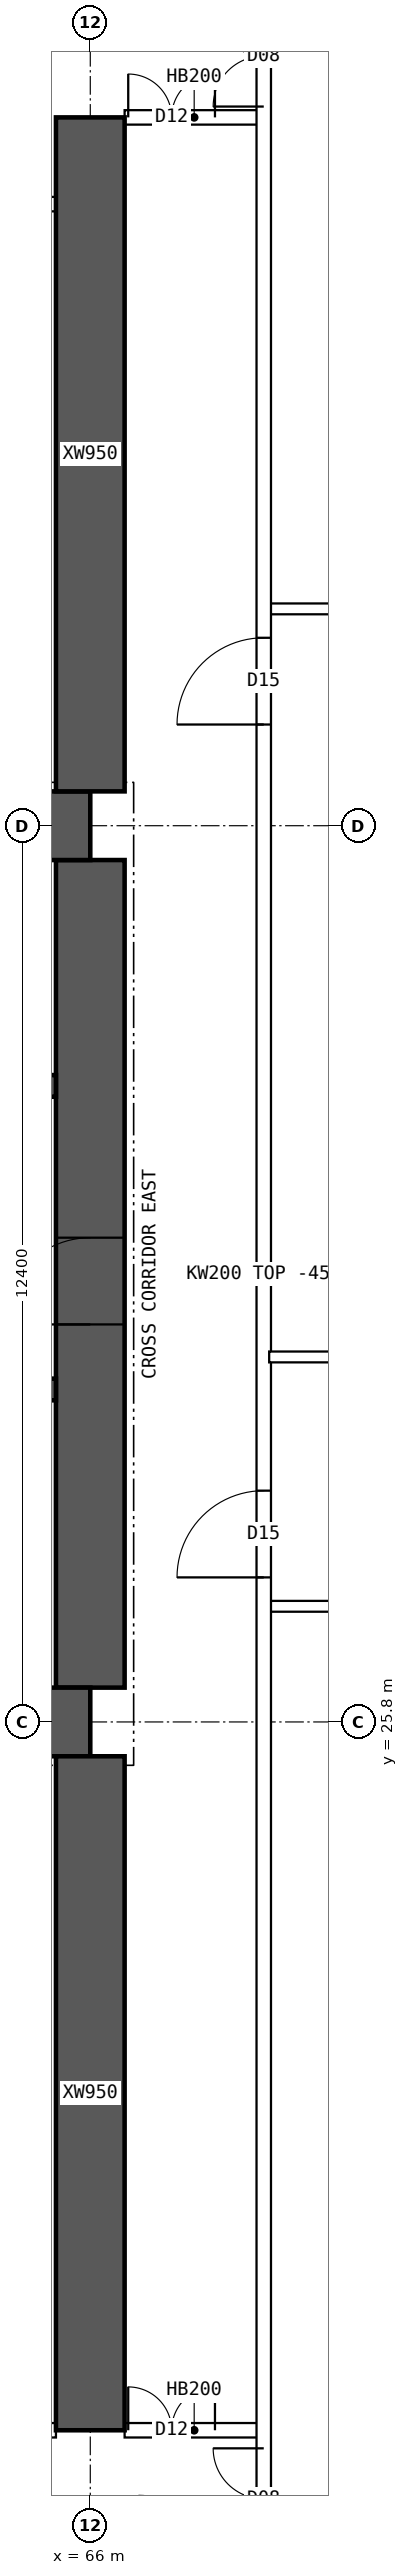
"""IFC4 building model, lengths in metres.
Left out: names, types, materials, properties, quantities, classifications, styles, units other than length and angle.
Written with IfcOpenShell. Run it as: python <this file> out.ifc"""

import sys

from ifc_helpers import new_model, si_unit, direction, frame, frame_2d, origin, place, context, subcontext, project, spatial, polyline, rectangle, outline, extrude, element, fill, save


model = new_model("IFC4")
c1 = context("Model", 3, precision=1e-05, world=origin(), true_north=direction((0.0, 1.0)))
c2 = subcontext(c1, "Body", "Model", "MODEL_VIEW")
j1 = project(units=[si_unit("LENGTHUNIT", "METRE"), si_unit("PLANEANGLEUNIT", "RADIAN")], contexts=[c1])
p1 = place(None, origin())
s1 = spatial("IfcSite", under=j1, at=p1, CompositionType="ELEMENT")
p2 = place(p1, origin())
s2 = spatial("IfcBuilding", under=s1, at=p2, CompositionType="ELEMENT")
p3 = place(p2, frame((0.0, 0.0, 95.65)))
s3 = spatial("IfcBuildingStorey", under=s2, at=p3, CompositionType="ELEMENT", Elevation=95.65)
for number, where, z_axis, x_axis in (
    (1, (18.0, 25.8, 0.0), (0.0, 0.0, 1.0), (1.0, 0.0, 0.0)),
    (2, (18.0, 38.2, 0.0), (0.0, 0.0, 1.0), (1.0, 0.0, 0.0)),
):
    element("IfcWall", number, at=place(p3, frame(where, z_axis=z_axis, x_axis=x_axis)), inside=s3, PredefinedType="SHEAR", context=c2, shape_type="SweptSolid", body=[
        extrude(rectangle(XDim=48.0, YDim=0.95, at=frame_2d((24.0, 0.0))), origin(), (0.0, 0.0, 1.0), 3.75),
    ])
p4 = place(p3, frame((66.0, 26.275, 0.0), z_axis=(0.0, 0.0, 1.0), x_axis=(0.0, 1.0, 0.0)))
e3 = element("IfcWall", 3, at=p4, inside=s3, PredefinedType="SHEAR", context=c2, shape_type="SweptSolid", body=[
    extrude(rectangle(XDim=11.45, YDim=0.95, at=frame_2d((5.725, 0.0))), origin(), (0.0, 0.0, 1.0), 3.75),
])
p5 = place(p4, frame((5.025, 0.0, 0.0)))
e4 = element("IfcOpeningElement", 4, at=p5, cuts=e3, PredefinedType="OPENING", context=c2, shape_type="SweptSolid", body=[
    extrude(rectangle(XDim=1.2, YDim=2.1, at=frame_2d((0.6, 1.05))), frame((0.0, 0.485, 0.0), z_axis=(0.0, -1.0, 0.0), x_axis=(1.0, 0.0, 0.0)), (0.0, 0.0, 1.0), 0.97),
])
p6 = place(p3, frame((18.475, 30.4, 0.0), z_axis=(0.0, 0.0, 1.0), x_axis=(1.0, 0.0, 0.0)))
e5 = element("IfcWall", 5, at=p6, inside=s3, PredefinedType="SHEAR", context=c2, shape_type="SweptSolid", body=[
    extrude(rectangle(XDim=47.05, YDim=0.3, at=frame_2d((23.525, 0.0))), origin(), (0.0, 0.0, 1.0), 3.75),
])
p7 = place(p6, frame((0.4, 0.0, 0.0)))
e6 = element("IfcOpeningElement", 6, at=p7, cuts=e5, PredefinedType="OPENING", context=c2, shape_type="SweptSolid", body=[
    extrude(rectangle(XDim=1.0, YDim=2.1, at=frame_2d((0.5, 1.05))), frame((0.0, 0.16, 0.0), z_axis=(0.0, -1.0, 0.0), x_axis=(1.0, 0.0, 0.0)), (0.0, 0.0, 1.0), 0.32),
])
p8 = place(p6, frame((45.65, 0.0, 0.0)))
e7 = element("IfcOpeningElement", 7, at=p8, cuts=e5, PredefinedType="OPENING", context=c2, shape_type="SweptSolid", body=[
    extrude(rectangle(XDim=1.0, YDim=2.1, at=frame_2d((0.5, 1.05))), frame((0.0, 0.16, 0.0), z_axis=(0.0, -1.0, 0.0), x_axis=(1.0, 0.0, 0.0)), (0.0, 0.0, 1.0), 0.32),
])
p9 = place(p6, frame((8.275, 0.0, 0.0)))
e8 = element("IfcOpeningElement", 8, at=p9, cuts=e5, PredefinedType="OPENING", context=c2, shape_type="SweptSolid", body=[
    extrude(rectangle(XDim=1.1, YDim=2.1, at=frame_2d((0.55, 1.05))), frame((0.0, 0.16, 0.0), z_axis=(0.0, -1.0, 0.0), x_axis=(1.0, 0.0, 0.0)), (0.0, 0.0, 1.0), 0.32),
])
p10 = place(p6, frame((10.875, 0.0, 0.0)))
e9 = element("IfcOpeningElement", 9, at=p10, cuts=e5, PredefinedType="OPENING", context=c2, shape_type="SweptSolid", body=[
    extrude(rectangle(XDim=1.1, YDim=2.1, at=frame_2d((0.55, 1.05))), frame((0.0, 0.16, 0.0), z_axis=(0.0, -1.0, 0.0), x_axis=(1.0, 0.0, 0.0)), (0.0, 0.0, 1.0), 0.32),
])
p11 = place(p6, frame((13.475, 0.0, 0.0)))
e10 = element("IfcOpeningElement", 10, at=p11, cuts=e5, PredefinedType="OPENING", context=c2, shape_type="SweptSolid", body=[
    extrude(rectangle(XDim=1.1, YDim=2.1, at=frame_2d((0.55, 1.05))), frame((0.0, 0.16, 0.0), z_axis=(0.0, -1.0, 0.0), x_axis=(1.0, 0.0, 0.0)), (0.0, 0.0, 1.0), 0.32),
])
p12 = place(p6, frame((16.075, 0.0, 0.0)))
e11 = element("IfcOpeningElement", 11, at=p12, cuts=e5, PredefinedType="OPENING", context=c2, shape_type="SweptSolid", body=[
    extrude(rectangle(XDim=1.1, YDim=2.1, at=frame_2d((0.55, 1.05))), frame((0.0, 0.16, 0.0), z_axis=(0.0, -1.0, 0.0), x_axis=(1.0, 0.0, 0.0)), (0.0, 0.0, 1.0), 0.32),
])
p13 = place(p6, frame((18.85, 0.0, 0.0)))
e12 = element("IfcOpeningElement", 12, at=p13, cuts=e5, PredefinedType="OPENING", context=c2, shape_type="SweptSolid", body=[
    extrude(rectangle(XDim=0.9, YDim=2.1, at=frame_2d((0.45, 1.05))), frame((0.0, 0.16, 0.0), z_axis=(0.0, -1.0, 0.0), x_axis=(1.0, 0.0, 0.0)), (0.0, 0.0, 1.0), 0.32),
])
p14 = place(p6, frame((30.142, 0.0, 0.0)))
e13 = element("IfcOpeningElement", 13, at=p14, cuts=e5, PredefinedType="OPENING", context=c2, shape_type="SweptSolid", body=[
    extrude(rectangle(XDim=1.1, YDim=2.1, at=frame_2d((0.55, 1.05))), frame((0.0, 0.16, 0.0), z_axis=(0.0, -1.0, 0.0), x_axis=(1.0, 0.0, 0.0)), (0.0, 0.0, 1.0), 0.32),
])
p15 = place(p6, frame((33.675, 0.0, 0.0)))
e14 = element("IfcOpeningElement", 14, at=p15, cuts=e5, PredefinedType="OPENING", context=c2, shape_type="SweptSolid", body=[
    extrude(rectangle(XDim=1.1, YDim=2.1, at=frame_2d((0.55, 1.05))), frame((0.0, 0.16, 0.0), z_axis=(0.0, -1.0, 0.0), x_axis=(1.0, 0.0, 0.0)), (0.0, 0.0, 1.0), 0.32),
])
p16 = place(p6, frame((37.208, 0.0, 0.0)))
e15 = element("IfcOpeningElement", 15, at=p16, cuts=e5, PredefinedType="OPENING", context=c2, shape_type="SweptSolid", body=[
    extrude(rectangle(XDim=1.1, YDim=2.1, at=frame_2d((0.55, 1.05))), frame((0.0, 0.16, 0.0), z_axis=(0.0, -1.0, 0.0), x_axis=(1.0, 0.0, 0.0)), (0.0, 0.0, 1.0), 0.32),
])
p17 = place(p3, frame((18.475, 34.6, 0.0), z_axis=(0.0, 0.0, 1.0), x_axis=(1.0, 0.0, 0.0)))
e16 = element("IfcWall", 16, at=p17, inside=s3, PredefinedType="SHEAR", context=c2, shape_type="SweptSolid", body=[
    extrude(rectangle(XDim=47.05, YDim=0.3, at=frame_2d((23.525, 0.0))), origin(), (0.0, 0.0, 1.0), 3.75),
])
p18 = place(p17, frame((0.9, 0.0, 0.0)))
e17 = element("IfcOpeningElement", 17, at=p18, cuts=e16, PredefinedType="OPENING", context=c2, shape_type="SweptSolid", body=[
    extrude(rectangle(XDim=1.1, YDim=2.1, at=frame_2d((0.55, 1.05))), frame((0.0, 0.16, 0.0), z_axis=(0.0, -1.0, 0.0), x_axis=(1.0, 0.0, 0.0)), (0.0, 0.0, 1.0), 0.32),
])
p19 = place(p17, frame((45.05, 0.0, 0.0)))
e18 = element("IfcOpeningElement", 18, at=p19, cuts=e16, PredefinedType="OPENING", context=c2, shape_type="SweptSolid", body=[
    extrude(rectangle(XDim=1.1, YDim=2.1, at=frame_2d((0.55, 1.05))), frame((0.0, 0.16, 0.0), z_axis=(0.0, -1.0, 0.0), x_axis=(1.0, 0.0, 0.0)), (0.0, 0.0, 1.0), 0.32),
])
p20 = place(p17, frame((4.125, 0.0, 0.0)))
e19 = element("IfcOpeningElement", 19, at=p20, cuts=e16, PredefinedType="OPENING", context=c2, shape_type="SweptSolid", body=[
    extrude(rectangle(XDim=0.9, YDim=2.1, at=frame_2d((0.45, 1.05))), frame((0.0, 0.16, 0.0), z_axis=(0.0, -1.0, 0.0), x_axis=(1.0, 0.0, 0.0)), (0.0, 0.0, 1.0), 0.32),
])
p21 = place(p17, frame((42.025, 0.0, 0.0)))
e20 = element("IfcOpeningElement", 20, at=p21, cuts=e16, PredefinedType="OPENING", context=c2, shape_type="SweptSolid", body=[
    extrude(rectangle(XDim=0.9, YDim=2.1, at=frame_2d((0.45, 1.05))), frame((0.0, 0.16, 0.0), z_axis=(0.0, -1.0, 0.0), x_axis=(1.0, 0.0, 0.0)), (0.0, 0.0, 1.0), 0.32),
])
p22 = place(p17, frame((8.9, 0.0, 0.0)))
e21 = element("IfcOpeningElement", 21, at=p22, cuts=e16, PredefinedType="OPENING", context=c2, shape_type="SweptSolid", body=[
    extrude(rectangle(XDim=0.9, YDim=2.1, at=frame_2d((0.45, 1.05))), frame((0.0, 0.16, 0.0), z_axis=(0.0, -1.0, 0.0), x_axis=(1.0, 0.0, 0.0)), (0.0, 0.0, 1.0), 0.32),
])
p23 = place(p17, frame((12.874, 0.0, 0.0)))
e22 = element("IfcOpeningElement", 22, at=p23, cuts=e16, PredefinedType="OPENING", context=c2, shape_type="SweptSolid", body=[
    extrude(rectangle(XDim=0.9, YDim=2.1, at=frame_2d((0.45, 1.05))), frame((0.0, 0.16, 0.0), z_axis=(0.0, -1.0, 0.0), x_axis=(1.0, 0.0, 0.0)), (0.0, 0.0, 1.0), 0.32),
])
p24 = place(p17, frame((16.521, 0.0, 0.0)))
e23 = element("IfcOpeningElement", 23, at=p24, cuts=e16, PredefinedType="OPENING", context=c2, shape_type="SweptSolid", body=[
    extrude(rectangle(XDim=0.9, YDim=2.1, at=frame_2d((0.45, 1.05))), frame((0.0, 0.16, 0.0), z_axis=(0.0, -1.0, 0.0), x_axis=(1.0, 0.0, 0.0)), (0.0, 0.0, 1.0), 0.32),
])
p25 = place(p17, frame((20.28, 0.0, 0.0)))
e24 = element("IfcOpeningElement", 24, at=p25, cuts=e16, PredefinedType="OPENING", context=c2, shape_type="SweptSolid", body=[
    extrude(rectangle(XDim=0.9, YDim=2.1, at=frame_2d((0.45, 1.05))), frame((0.0, 0.16, 0.0), z_axis=(0.0, -1.0, 0.0), x_axis=(1.0, 0.0, 0.0)), (0.0, 0.0, 1.0), 0.32),
])
p26 = place(p17, frame((24.686, 0.0, 0.0)))
e25 = element("IfcOpeningElement", 25, at=p26, cuts=e16, PredefinedType="OPENING", context=c2, shape_type="SweptSolid", body=[
    extrude(rectangle(XDim=0.9, YDim=2.1, at=frame_2d((0.45, 1.05))), frame((0.0, 0.16, 0.0), z_axis=(0.0, -1.0, 0.0), x_axis=(1.0, 0.0, 0.0)), (0.0, 0.0, 1.0), 0.32),
])
p27 = place(p17, frame((27.483, 0.0, 0.0)))
e26 = element("IfcOpeningElement", 26, at=p27, cuts=e16, PredefinedType="OPENING", context=c2, shape_type="SweptSolid", body=[
    extrude(rectangle(XDim=0.9, YDim=2.1, at=frame_2d((0.45, 1.05))), frame((0.0, 0.16, 0.0), z_axis=(0.0, -1.0, 0.0), x_axis=(1.0, 0.0, 0.0)), (0.0, 0.0, 1.0), 0.32),
])
p28 = place(p17, frame((30.666, 0.0, 0.0)))
e27 = element("IfcOpeningElement", 27, at=p28, cuts=e16, PredefinedType="OPENING", context=c2, shape_type="SweptSolid", body=[
    extrude(rectangle(XDim=0.9, YDim=2.1, at=frame_2d((0.45, 1.05))), frame((0.0, 0.16, 0.0), z_axis=(0.0, -1.0, 0.0), x_axis=(1.0, 0.0, 0.0)), (0.0, 0.0, 1.0), 0.32),
])
p29 = place(p17, frame((34.617, 0.0, 0.0)))
e28 = element("IfcOpeningElement", 28, at=p29, cuts=e16, PredefinedType="OPENING", context=c2, shape_type="SweptSolid", body=[
    extrude(rectangle(XDim=0.9, YDim=2.1, at=frame_2d((0.45, 1.05))), frame((0.0, 0.16, 0.0), z_axis=(0.0, -1.0, 0.0), x_axis=(1.0, 0.0, 0.0)), (0.0, 0.0, 1.0), 0.32),
])
p30 = place(p17, frame((37.555, 0.0, 0.0)))
e29 = element("IfcOpeningElement", 29, at=p30, cuts=e16, PredefinedType="OPENING", context=c2, shape_type="SweptSolid", body=[
    extrude(rectangle(XDim=0.9, YDim=2.1, at=frame_2d((0.45, 1.05))), frame((0.0, 0.16, 0.0), z_axis=(0.0, -1.0, 0.0), x_axis=(1.0, 0.0, 0.0)), (0.0, 0.0, 1.0), 0.32),
])
for number, where, z_axis, x_axis in (
    (30, (66.0, 16.0, 0.0), (0.0, 0.0, 1.0), (0.0, 1.0, 0.0)),
    (31, (66.0, 38.675, 0.0), (0.0, 0.0, 1.0), (0.0, 1.0, 0.0)),
):
    element("IfcWall", number, at=place(p3, frame(where, z_axis=z_axis, x_axis=x_axis)), inside=s3, PredefinedType="SHEAR", context=c2, shape_type="SweptSolid", body=[
        extrude(rectangle(XDim=9.325, YDim=0.95, at=frame_2d((4.663, 0.0))), origin(), (0.0, 0.0, 1.0), 3.75),
    ])
p31 = place(p3, frame((60.475, 16.0, 0.0), z_axis=(0.0, 0.0, 1.0), x_axis=(1.0, 0.0, 0.0)))
e32 = element("IfcWall", 32, at=p31, inside=s3, PredefinedType="SOLIDWALL", context=c2, shape_type="SweptSolid", body=[
    extrude(rectangle(XDim=5.05, YDim=0.2, at=frame_2d((2.525, 0.0))), origin(), (0.0, 0.0, 1.0), 3.3),
])
p32 = place(p31, frame((0.15, 0.0, 0.0)))
e33 = element("IfcOpeningElement", 33, at=p32, cuts=e32, PredefinedType="OPENING", context=c2, shape_type="SweptSolid", body=[
    extrude(rectangle(XDim=0.9, YDim=2.1, at=frame_2d((0.45, 1.05))), frame((0.0, 0.11, 0.0), z_axis=(0.0, -1.0, 0.0), x_axis=(1.0, 0.0, 0.0)), (0.0, 0.0, 1.0), 0.22),
])
p33 = place(p31, frame((3.185, 0.0, 0.0)))
e34 = element("IfcOpeningElement", 34, at=p33, cuts=e32, PredefinedType="OPENING", context=c2, shape_type="SweptSolid", body=[
    extrude(rectangle(XDim=0.9, YDim=2.1, at=frame_2d((0.45, 1.05))), frame((0.0, 0.11, 0.0), z_axis=(0.0, -1.0, 0.0), x_axis=(1.0, 0.0, 0.0)), (0.0, 0.0, 1.0), 0.22),
])
p34 = place(p3, frame((66.475, 16.0, 0.0), z_axis=(0.0, 0.0, 1.0), x_axis=(1.0, 0.0, 0.0)))
e35 = element("IfcWall", 35, at=p34, inside=s3, PredefinedType="SOLIDWALL", context=c2, shape_type="SweptSolid", body=[
    extrude(rectangle(XDim=1.925, YDim=0.2, at=frame_2d((0.962, 0.0))), origin(), (0.0, 0.0, 1.0), 3.3),
])
p35 = place(p34, frame((0.05, 0.0, 0.0)))
e36 = element("IfcOpeningElement", 36, at=p35, cuts=e35, PredefinedType="OPENING", context=c2, shape_type="SweptSolid", body=[
    extrude(rectangle(XDim=1.2, YDim=2.1, at=frame_2d((0.6, 1.05))), frame((0.0, 0.11, 0.0), z_axis=(0.0, -1.0, 0.0), x_axis=(1.0, 0.0, 0.0)), (0.0, 0.0, 1.0), 0.22),
])
p36 = place(p3, frame((66.475, 48.0, 0.0), z_axis=(0.0, 0.0, 1.0), x_axis=(1.0, 0.0, 0.0)))
e37 = element("IfcWall", 37, at=p36, inside=s3, PredefinedType="SOLIDWALL", context=c2, shape_type="SweptSolid", body=[
    extrude(rectangle(XDim=1.925, YDim=0.2, at=frame_2d((0.962, 0.0))), origin(), (0.0, 0.0, 1.0), 3.3),
])
p37 = place(p36, frame((0.05, 0.0, 0.0)))
e38 = element("IfcOpeningElement", 38, at=p37, cuts=e37, PredefinedType="OPENING", context=c2, shape_type="SweptSolid", body=[
    extrude(rectangle(XDim=1.2, YDim=2.1, at=frame_2d((0.6, 1.05))), frame((0.0, 0.11, 0.0), z_axis=(0.0, -1.0, 0.0), x_axis=(1.0, 0.0, 0.0)), (0.0, 0.0, 1.0), 0.22),
])
p38 = place(p3, frame((60.475, 46.8, 0.0), z_axis=(0.0, 0.0, 1.0), x_axis=(1.0, 0.0, 0.0)))
e39 = element("IfcWall", 39, at=p38, inside=s3, PredefinedType="SOLIDWALL", context=c2, shape_type="SweptSolid", body=[
    extrude(rectangle(XDim=5.05, YDim=0.2, at=frame_2d((2.525, 0.0))), origin(), (0.0, 0.0, 1.0), 3.3),
])
p39 = place(p38, frame((0.4, 0.0, 0.0)))
e40 = element("IfcOpeningElement", 40, at=p39, cuts=e39, PredefinedType="OPENING", context=c2, shape_type="SweptSolid", body=[
    extrude(rectangle(XDim=1.0, YDim=2.1, at=frame_2d((0.5, 1.05))), frame((0.0, 0.11, 0.0), z_axis=(0.0, -1.0, 0.0), x_axis=(1.0, 0.0, 0.0)), (0.0, 0.0, 1.0), 0.22),
])
p40 = place(p3, frame((68.475, 30.85, 0.0), z_axis=(0.0, 0.0, 1.0), x_axis=(1.0, 0.0, 0.0)))
e41 = element("IfcWall", 41, at=p40, inside=s3, PredefinedType="PARTITIONING", context=c2, shape_type="SweptSolid", body=[
    extrude(outline(polyline([(0.0, 0.0), (6.82, 0.0), (6.82, 3.3), (3.827, 3.3), (3.825, 2.85), (3.227, 2.85), (3.225, 3.3), (0.0, 3.3), (0.0, 0.0)])), frame((0.0, 0.075, 0.0), z_axis=(0.0, -1.0, 0.0), x_axis=(1.0, 0.0, 0.0)), (0.0, 0.0, 1.0), 0.15),
])
p41 = place(p3, frame((68.4, 9.405, 0.0), z_axis=(0.0, 0.0, 1.0), x_axis=(0.0, 1.0, 0.0)))
e42 = element("IfcWall", 42, at=p41, inside=s3, PredefinedType="SOLIDWALL", context=c2, shape_type="SweptSolid", body=[
    extrude(rectangle(XDim=45.189, YDim=0.2, at=frame_2d((22.595, 0.0))), origin(), (0.0, 0.0, 1.0), 3.3),
])
p42 = place(p41, frame((18.395, 0.0, 0.0)))
e43 = element("IfcOpeningElement", 43, at=p42, cuts=e42, PredefinedType="OPENING", context=c2, shape_type="SweptSolid", body=[
    extrude(rectangle(XDim=1.2, YDim=2.1, at=frame_2d((0.6, 1.05))), frame((0.0, 0.11, 0.0), z_axis=(0.0, -1.0, 0.0), x_axis=(1.0, 0.0, 0.0)), (0.0, 0.0, 1.0), 0.22),
])
p43 = place(p41, frame((30.195, 0.0, 0.0)))
e44 = element("IfcOpeningElement", 44, at=p43, cuts=e42, PredefinedType="OPENING", context=c2, shape_type="SweptSolid", body=[
    extrude(rectangle(XDim=1.2, YDim=2.1, at=frame_2d((0.6, 1.05))), frame((0.0, 0.11, 0.0), z_axis=(0.0, -1.0, 0.0), x_axis=(1.0, 0.0, 0.0)), (0.0, 0.0, 1.0), 0.22),
])
p44 = place(p41, frame((4.945, 0.0, 0.0)))
e45 = element("IfcOpeningElement", 45, at=p44, cuts=e42, PredefinedType="OPENING", context=c2, shape_type="SweptSolid", body=[
    extrude(rectangle(XDim=1.4, YDim=2.1, at=frame_2d((0.7, 1.05))), frame((0.0, 0.11, 0.0), z_axis=(0.0, -1.0, 0.0), x_axis=(1.0, 0.0, 0.0)), (0.0, 0.0, 1.0), 0.22),
])
p45 = place(p41, frame((38.745, 0.0, 0.0)))
e46 = element("IfcOpeningElement", 46, at=p45, cuts=e42, PredefinedType="OPENING", context=c2, shape_type="SweptSolid", body=[
    extrude(rectangle(XDim=1.4, YDim=2.1, at=frame_2d((0.7, 1.05))), frame((0.0, 0.11, 0.0), z_axis=(0.0, -1.0, 0.0), x_axis=(1.0, 0.0, 0.0)), (0.0, 0.0, 1.0), 0.22),
])
p46 = place(p3, frame((68.475, 27.4, 0.0), z_axis=(0.0, 0.0, 1.0), x_axis=(1.0, 0.0, 0.0)))
e47 = element("IfcWall", 47, at=p46, inside=s3, PredefinedType="PARTITIONING", context=c2, shape_type="SweptSolid", body=[
    extrude(rectangle(XDim=6.82, YDim=0.15, at=frame_2d((3.41, 0.0))), origin(), (0.0, 0.0, 1.0), 3.3),
])
p47 = place(p3, frame((68.475, 41.2, 0.0), z_axis=(0.0, 0.0, 1.0), x_axis=(1.0, 0.0, 0.0)))
e48 = element("IfcWall", 48, at=p47, inside=s3, PredefinedType="PARTITIONING", context=c2, shape_type="SweptSolid", body=[
    extrude(outline(polyline([(0.0, 0.0), (6.82, 0.0), (6.82, 3.3), (3.827, 3.3), (3.825, 2.85), (3.227, 2.85), (3.225, 3.3), (0.0, 3.3), (0.0, 0.0)])), frame((0.0, 0.075, 0.0), z_axis=(0.0, -1.0, 0.0), x_axis=(1.0, 0.0, 0.0)), (0.0, 0.0, 1.0), 0.15),
])
p48 = place(p5, origin())
e49 = element("IfcDoor", 49, at=p48, inside=s3, OperationType="SINGLE_SWING_LEFT", PredefinedType="DOOR", context=c2, shape_type="SweptSolid", body=[
    extrude(rectangle(XDim=1.2, YDim=2.1, at=frame_2d((0.6, 1.05))), frame((0.0, 0.025, 0.0), z_axis=(0.0, -1.0, 0.0), x_axis=(1.0, 0.0, 0.0)), (0.0, 0.0, 1.0), 0.05),
])
fill(e4, e49)
p49 = place(p35, origin())
e50 = element("IfcDoor", 50, at=p49, inside=s3, OperationType="DOUBLE_DOOR_SINGLE_SWING", PredefinedType="DOOR", context=c2, shape_type="SweptSolid", body=[
    extrude(rectangle(XDim=1.2, YDim=2.1, at=frame_2d((0.6, 1.05))), frame((0.0, 0.025, 0.0), z_axis=(0.0, -1.0, 0.0), x_axis=(1.0, 0.0, 0.0)), (0.0, 0.0, 1.0), 0.05),
])
fill(e36, e50)
p50 = place(p37, origin())
e51 = element("IfcDoor", 51, at=p50, inside=s3, OperationType="DOUBLE_DOOR_SINGLE_SWING", PredefinedType="DOOR", context=c2, shape_type="SweptSolid", body=[
    extrude(rectangle(XDim=1.2, YDim=2.1, at=frame_2d((0.6, 1.05))), frame((0.0, 0.025, 0.0), z_axis=(0.0, -1.0, 0.0), x_axis=(1.0, 0.0, 0.0)), (0.0, 0.0, 1.0), 0.05),
])
fill(e38, e51)
p51 = place(p42, origin())
e52 = element("IfcDoor", 52, at=p51, inside=s3, OperationType="SINGLE_SWING_LEFT", PredefinedType="DOOR", context=c2, shape_type="SweptSolid", body=[
    extrude(rectangle(XDim=1.2, YDim=2.1, at=frame_2d((0.6, 1.05))), frame((0.0, 0.025, 0.0), z_axis=(0.0, -1.0, 0.0), x_axis=(1.0, 0.0, 0.0)), (0.0, 0.0, 1.0), 0.05),
])
fill(e43, e52)
p52 = place(p43, origin())
e53 = element("IfcDoor", 53, at=p52, inside=s3, OperationType="SINGLE_SWING_LEFT", PredefinedType="DOOR", context=c2, shape_type="SweptSolid", body=[
    extrude(rectangle(XDim=1.2, YDim=2.1, at=frame_2d((0.6, 1.05))), frame((0.0, 0.025, 0.0), z_axis=(0.0, -1.0, 0.0), x_axis=(1.0, 0.0, 0.0)), (0.0, 0.0, 1.0), 0.05),
])
fill(e44, e53)
p53 = place(p44, origin())
e54 = element("IfcDoor", 54, at=p53, inside=s3, OperationType="DOUBLE_DOOR_SINGLE_SWING", PredefinedType="DOOR", context=c2, shape_type="SweptSolid", body=[
    extrude(rectangle(XDim=1.4, YDim=2.1, at=frame_2d((0.7, 1.05))), frame((0.0, 0.025, 0.0), z_axis=(0.0, -1.0, 0.0), x_axis=(1.0, 0.0, 0.0)), (0.0, 0.0, 1.0), 0.05),
])
fill(e45, e54)
p54 = place(p45, origin())
e55 = element("IfcDoor", 55, at=p54, inside=s3, OperationType="DOUBLE_DOOR_SINGLE_SWING", PredefinedType="DOOR", context=c2, shape_type="SweptSolid", body=[
    extrude(rectangle(XDim=1.4, YDim=2.1, at=frame_2d((0.7, 1.05))), frame((0.0, 0.025, 0.0), z_axis=(0.0, -1.0, 0.0), x_axis=(1.0, 0.0, 0.0)), (0.0, 0.0, 1.0), 0.05),
])
fill(e46, e55)
save(model, sys.argv[1])
